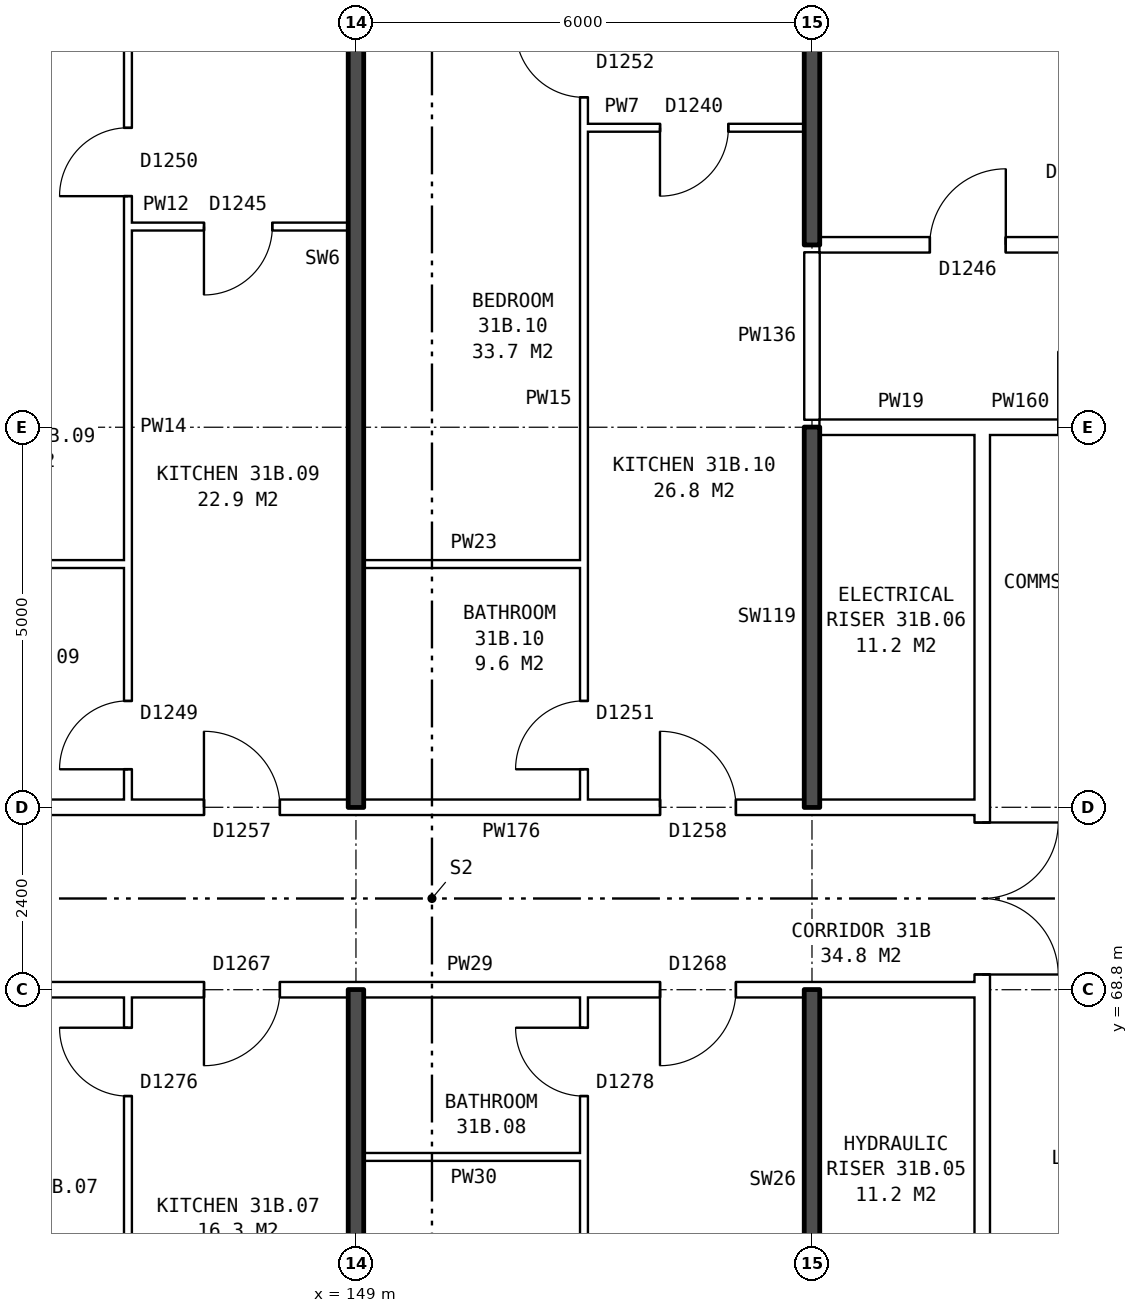
"""IFC4 building model, lengths in metres.
Left out: names, types, materials, properties, quantities, classifications, styles, units other than length and angle.
Written with IfcOpenShell. Run it as: python <this file> out.ifc"""

import sys

from ifc_helpers import new_model, si_unit, direction, frame, frame_2d, origin, place, context, subcontext, project, spatial, rectangle, extrude, element, fill, save


model = new_model("IFC4")
c1 = context("Model", 3, precision=1e-05, world=origin(), true_north=direction((0.0, 1.0)))
c2 = subcontext(c1, "Body", "Model", "MODEL_VIEW")
j1 = project(units=[si_unit("LENGTHUNIT", "METRE"), si_unit("PLANEANGLEUNIT", "RADIAN")], contexts=[c1])
p1 = place(None, origin())
s1 = spatial("IfcSite", under=j1, at=p1, CompositionType="ELEMENT")
p2 = place(p1, origin())
s2 = spatial("IfcBuilding", under=s1, at=p2, CompositionType="ELEMENT")
p3 = place(p2, frame((0.0, 0.0, 111.9)))
s3 = spatial("IfcBuildingStorey", under=s2, at=p3, CompositionType="ELEMENT", Elevation=111.9)
p4 = place(p3, frame((157.24, 63.9, 0.0), z_axis=(0.0, 0.0, 1.0), x_axis=(0.0, 1.0, 0.0)))
e1 = element("IfcWall", 1, at=p4, inside=s3, PredefinedType="PARTITIONING", context=c2, shape_type="SweptSolid", body=[
    extrude(rectangle(XDim=12.2, YDim=0.2, at=frame_2d((6.1, 0.0))), origin(), (0.0, 0.0, 1.0), 2.85),
])
p5 = place(p4, frame((5.1, 0.0, 0.0)))
e2 = element("IfcOpeningElement", 2, at=p5, cuts=e1, PredefinedType="OPENING", context=c2, shape_type="SweptSolid", body=[
    extrude(rectangle(XDim=2.0, YDim=2.1, at=frame_2d((1.0, 1.05))), frame((0.0, 0.11, 0.0), z_axis=(0.0, -1.0, 0.0), x_axis=(1.0, 0.0, 0.0)), (0.0, 0.0, 1.0), 0.22),
])
p6 = place(p3, frame((149.1, 66.6, 0.0), z_axis=(0.0, 0.0, 1.0), x_axis=(1.0, 0.0, 0.0)))
e3 = element("IfcWall", 3, at=p6, inside=s3, PredefinedType="PARTITIONING", context=c2, shape_type="SweptSolid", body=[
    extrude(rectangle(XDim=2.9, YDim=0.1, at=frame_2d((1.45, 0.0))), origin(), (0.0, 0.0, 1.0), 2.85),
])
p7 = place(p3, frame((142.76, 68.8, 0.0), z_axis=(0.0, 0.0, 1.0), x_axis=(1.0, 0.0, 0.0)))
e4 = element("IfcWall", 4, at=p7, inside=s3, PredefinedType="PARTITIONING", context=c2, shape_type="SweptSolid", body=[
    extrude(rectangle(XDim=14.48, YDim=0.2, at=frame_2d((7.24, 0.0))), origin(), (0.0, 0.0, 1.0), 2.85),
])
p8 = place(p7, frame((4.24, 0.0, 0.0)))
e5 = element("IfcOpeningElement", 5, at=p8, cuts=e4, PredefinedType="OPENING", context=c2, shape_type="SweptSolid", body=[
    extrude(rectangle(XDim=1.0, YDim=2.1, at=frame_2d((0.5, 1.05))), frame((0.0, 0.11, 0.0), z_axis=(0.0, -1.0, 0.0), x_axis=(1.0, 0.0, 0.0)), (0.0, 0.0, 1.0), 0.22),
])
p9 = place(p7, frame((10.24, 0.0, 0.0)))
e6 = element("IfcOpeningElement", 6, at=p9, cuts=e4, PredefinedType="OPENING", context=c2, shape_type="SweptSolid", body=[
    extrude(rectangle(XDim=1.0, YDim=2.1, at=frame_2d((0.5, 1.05))), frame((0.0, 0.11, 0.0), z_axis=(0.0, -1.0, 0.0), x_axis=(1.0, 0.0, 0.0)), (0.0, 0.0, 1.0), 0.22),
])
p10 = place(p3, frame((142.76, 71.2, 0.0), z_axis=(0.0, 0.0, 1.0), x_axis=(1.0, 0.0, 0.0)))
e7 = element("IfcWall", 7, at=p10, inside=s3, PredefinedType="PARTITIONING", context=c2, shape_type="SweptSolid", body=[
    extrude(rectangle(XDim=14.48, YDim=0.2, at=frame_2d((7.24, 0.0))), origin(), (0.0, 0.0, 1.0), 2.85),
])
p11 = place(p10, frame((4.24, 0.0, 0.0)))
e8 = element("IfcOpeningElement", 8, at=p11, cuts=e7, PredefinedType="OPENING", context=c2, shape_type="SweptSolid", body=[
    extrude(rectangle(XDim=1.0, YDim=2.1, at=frame_2d((0.5, 1.05))), frame((0.0, 0.11, 0.0), z_axis=(0.0, -1.0, 0.0), x_axis=(1.0, 0.0, 0.0)), (0.0, 0.0, 1.0), 0.22),
])
p12 = place(p10, frame((10.24, 0.0, 0.0)))
e9 = element("IfcOpeningElement", 9, at=p12, cuts=e7, PredefinedType="OPENING", context=c2, shape_type="SweptSolid", body=[
    extrude(rectangle(XDim=1.0, YDim=2.1, at=frame_2d((0.5, 1.05))), frame((0.0, 0.11, 0.0), z_axis=(0.0, -1.0, 0.0), x_axis=(1.0, 0.0, 0.0)), (0.0, 0.0, 1.0), 0.22),
])
p13 = place(p3, frame((142.76, 74.4, 0.0), z_axis=(0.0, 0.0, 1.0), x_axis=(1.0, 0.0, 0.0)))
e10 = element("IfcWall", 10, at=p13, inside=s3, PredefinedType="PARTITIONING", context=c2, shape_type="SweptSolid", body=[
    extrude(rectangle(XDim=3.24, YDim=0.1, at=frame_2d((1.62, 0.0))), origin(), (0.0, 0.0, 1.0), 2.85),
])
p14 = place(p3, frame((149.1, 74.4, 0.0), z_axis=(0.0, 0.0, 1.0), x_axis=(1.0, 0.0, 0.0)))
e11 = element("IfcWall", 11, at=p14, inside=s3, PredefinedType="PARTITIONING", context=c2, shape_type="SweptSolid", body=[
    extrude(rectangle(XDim=2.9, YDim=0.1, at=frame_2d((1.45, 0.0))), origin(), (0.0, 0.0, 1.0), 2.85),
])
p15 = place(p3, frame((155.1, 76.2, 0.0), z_axis=(0.0, 0.0, 1.0), x_axis=(1.0, 0.0, 0.0)))
e12 = element("IfcWall", 12, at=p15, inside=s3, PredefinedType="PARTITIONING", context=c2, shape_type="SweptSolid", body=[
    extrude(rectangle(XDim=2.14, YDim=0.2, at=frame_2d((1.07, 0.0))), origin(), (0.0, 0.0, 1.0), 2.85),
])
p16 = place(p3, frame((157.24, 76.2, 0.0), z_axis=(0.0, 0.0, 1.0), x_axis=(1.0, 0.0, 0.0)))
e13 = element("IfcWall", 13, at=p16, inside=s3, PredefinedType="PARTITIONING", context=c2, shape_type="SweptSolid", body=[
    extrude(rectangle(XDim=3.0, YDim=0.2, at=frame_2d((1.5, 0.0))), origin(), (0.0, 0.0, 1.0), 2.85),
])
p17 = place(p16, frame((1.0, 0.0, 0.0)))
e14 = element("IfcOpeningElement", 14, at=p17, cuts=e13, PredefinedType="OPENING", context=c2, shape_type="SweptSolid", body=[
    extrude(rectangle(XDim=1.0, YDim=2.1, at=frame_2d((0.5, 1.05))), frame((0.0, 0.11, 0.0), z_axis=(0.0, -1.0, 0.0), x_axis=(1.0, 0.0, 0.0)), (0.0, 0.0, 1.0), 0.22),
])
p18 = place(p3, frame((155.1, 78.6, 0.0), z_axis=(0.0, 0.0, 1.0), x_axis=(1.0, 0.0, 0.0)))
e15 = element("IfcWall", 15, at=p18, inside=s3, PredefinedType="PARTITIONING", context=c2, shape_type="SweptSolid", body=[
    extrude(rectangle(XDim=18.54, YDim=0.2, at=frame_2d((9.27, 0.0))), origin(), (0.0, 0.0, 1.0), 2.85),
])
p19 = place(p18, frame((1.45, 0.0, 0.0)))
e16 = element("IfcOpeningElement", 16, at=p19, cuts=e15, PredefinedType="OPENING", context=c2, shape_type="SweptSolid", body=[
    extrude(rectangle(XDim=1.0, YDim=2.1, at=frame_2d((0.5, 1.05))), frame((0.0, 0.11, 0.0), z_axis=(0.0, -1.0, 0.0), x_axis=(1.0, 0.0, 0.0)), (0.0, 0.0, 1.0), 0.22),
])
p20 = place(p18, frame((9.6, 0.0, 0.0)))
e17 = element("IfcOpeningElement", 17, at=p20, cuts=e15, PredefinedType="OPENING", context=c2, shape_type="SweptSolid", body=[
    extrude(rectangle(XDim=1.0, YDim=2.1, at=frame_2d((0.5, 1.05))), frame((0.0, 0.11, 0.0), z_axis=(0.0, -1.0, 0.0), x_axis=(1.0, 0.0, 0.0)), (0.0, 0.0, 1.0), 0.22),
])
p21 = place(p18, frame((15.92, 0.0, 0.0)))
e18 = element("IfcOpeningElement", 18, at=p21, cuts=e15, PredefinedType="OPENING", context=c2, shape_type="SweptSolid", body=[
    extrude(rectangle(XDim=1.0, YDim=2.1, at=frame_2d((0.5, 1.05))), frame((0.0, 0.11, 0.0), z_axis=(0.0, -1.0, 0.0), x_axis=(1.0, 0.0, 0.0)), (0.0, 0.0, 1.0), 0.22),
])
p22 = place(p3, frame((146.0, 78.84, 0.0), z_axis=(0.0, 0.0, 1.0), x_axis=(1.0, 0.0, 0.0)))
e19 = element("IfcWall", 19, at=p22, inside=s3, PredefinedType="PARTITIONING", context=c2, shape_type="SweptSolid", body=[
    extrude(rectangle(XDim=2.9, YDim=0.1, at=frame_2d((1.45, 0.0))), origin(), (0.0, 0.0, 1.0), 2.85),
])
p23 = place(p22, frame((1.0, 0.0, 0.0)))
e20 = element("IfcOpeningElement", 20, at=p23, cuts=e19, PredefinedType="OPENING", context=c2, shape_type="SweptSolid", body=[
    extrude(rectangle(XDim=0.9, YDim=2.1, at=frame_2d((0.45, 1.05))), frame((0.0, 0.06, 0.0), z_axis=(0.0, -1.0, 0.0), x_axis=(1.0, 0.0, 0.0)), (0.0, 0.0, 1.0), 0.12),
])
p24 = place(p3, frame((152.0, 80.14, 0.0), z_axis=(0.0, 0.0, 1.0), x_axis=(1.0, 0.0, 0.0)))
e21 = element("IfcWall", 21, at=p24, inside=s3, PredefinedType="PARTITIONING", context=c2, shape_type="SweptSolid", body=[
    extrude(rectangle(XDim=2.9, YDim=0.1, at=frame_2d((1.45, 0.0))), origin(), (0.0, 0.0, 1.0), 2.85),
])
p25 = place(p24, frame((1.0, 0.0, 0.0)))
e22 = element("IfcOpeningElement", 22, at=p25, cuts=e21, PredefinedType="OPENING", context=c2, shape_type="SweptSolid", body=[
    extrude(rectangle(XDim=0.9, YDim=2.1, at=frame_2d((0.45, 1.05))), frame((0.0, 0.06, 0.0), z_axis=(0.0, -1.0, 0.0), x_axis=(1.0, 0.0, 0.0)), (0.0, 0.0, 1.0), 0.12),
])
p26 = place(p3, frame((146.0, 54.36, 0.0), z_axis=(0.0, 0.0, 1.0), x_axis=(0.0, 1.0, 0.0)))
e23 = element("IfcWall", 23, at=p26, inside=s3, PredefinedType="PARTITIONING", context=c2, shape_type="SweptSolid", body=[
    extrude(rectangle(XDim=14.34, YDim=0.1, at=frame_2d((7.17, 0.0))), origin(), (0.0, 0.0, 1.0), 2.85),
])
p27 = place(p26, frame((7.7, 0.0, 0.0)))
e24 = element("IfcOpeningElement", 24, at=p27, cuts=e23, PredefinedType="OPENING", context=c2, shape_type="SweptSolid", body=[
    extrude(rectangle(XDim=0.9, YDim=2.1, at=frame_2d((0.45, 1.05))), frame((0.0, 0.06, 0.0), z_axis=(0.0, -1.0, 0.0), x_axis=(1.0, 0.0, 0.0)), (0.0, 0.0, 1.0), 0.12),
])
p28 = place(p26, frame((13.04, 0.0, 0.0)))
e25 = element("IfcOpeningElement", 25, at=p28, cuts=e23, PredefinedType="OPENING", context=c2, shape_type="SweptSolid", body=[
    extrude(rectangle(XDim=0.9, YDim=2.1, at=frame_2d((0.45, 1.05))), frame((0.0, 0.06, 0.0), z_axis=(0.0, -1.0, 0.0), x_axis=(1.0, 0.0, 0.0)), (0.0, 0.0, 1.0), 0.12),
])
p29 = place(p3, frame((146.0, 71.3, 0.0), z_axis=(0.0, 0.0, 1.0), x_axis=(0.0, 1.0, 0.0)))
e26 = element("IfcWall", 26, at=p29, inside=s3, PredefinedType="PARTITIONING", context=c2, shape_type="SweptSolid", body=[
    extrude(rectangle(XDim=14.34, YDim=0.1, at=frame_2d((7.17, 0.0))), origin(), (0.0, 0.0, 1.0), 2.85),
])
p30 = place(p29, frame((7.94, 0.0, 0.0)))
e27 = element("IfcOpeningElement", 27, at=p30, cuts=e26, PredefinedType="OPENING", context=c2, shape_type="SweptSolid", body=[
    extrude(rectangle(XDim=0.9, YDim=2.1, at=frame_2d((0.45, 1.05))), frame((0.0, 0.06, 0.0), z_axis=(0.0, -1.0, 0.0), x_axis=(1.0, 0.0, 0.0)), (0.0, 0.0, 1.0), 0.12),
])
p31 = place(p29, frame((0.4, 0.0, 0.0)))
e28 = element("IfcOpeningElement", 28, at=p31, cuts=e26, PredefinedType="OPENING", context=c2, shape_type="SweptSolid", body=[
    extrude(rectangle(XDim=0.9, YDim=2.1, at=frame_2d((0.45, 1.05))), frame((0.0, 0.06, 0.0), z_axis=(0.0, -1.0, 0.0), x_axis=(1.0, 0.0, 0.0)), (0.0, 0.0, 1.0), 0.12),
])
for number, where, z_axis, x_axis in (
    (29, (149.0, 54.36, 0.0), (0.0, 0.0, 1.0), (0.0, 1.0, 0.0)),
    (30, (149.0, 71.2, 0.0), (0.0, 0.0, 1.0), (0.0, 1.0, 0.0)),
):
    element("IfcWall", number, at=place(p3, frame(where, z_axis=z_axis, x_axis=x_axis)), inside=s3, PredefinedType="SOLIDWALL", context=c2, shape_type="SweptSolid", body=[
        extrude(rectangle(XDim=14.44, YDim=0.2, at=frame_2d((7.22, 0.0))), origin(), (0.0, 0.0, 1.0), 2.85),
    ])
p32 = place(p3, frame((152.0, 54.36, 0.0), z_axis=(0.0, 0.0, 1.0), x_axis=(0.0, 1.0, 0.0)))
e31 = element("IfcWall", 31, at=p32, inside=s3, PredefinedType="PARTITIONING", context=c2, shape_type="SweptSolid", body=[
    extrude(rectangle(XDim=14.34, YDim=0.1, at=frame_2d((7.17, 0.0))), origin(), (0.0, 0.0, 1.0), 2.85),
])
p33 = place(p32, frame((7.7, 0.0, 0.0)))
e32 = element("IfcOpeningElement", 32, at=p33, cuts=e31, PredefinedType="OPENING", context=c2, shape_type="SweptSolid", body=[
    extrude(rectangle(XDim=0.9, YDim=2.1, at=frame_2d((0.45, 1.05))), frame((0.0, 0.06, 0.0), z_axis=(0.0, -1.0, 0.0), x_axis=(1.0, 0.0, 0.0)), (0.0, 0.0, 1.0), 0.12),
])
p34 = place(p32, frame((13.04, 0.0, 0.0)))
e33 = element("IfcOpeningElement", 33, at=p34, cuts=e31, PredefinedType="OPENING", context=c2, shape_type="SweptSolid", body=[
    extrude(rectangle(XDim=0.9, YDim=2.1, at=frame_2d((0.45, 1.05))), frame((0.0, 0.06, 0.0), z_axis=(0.0, -1.0, 0.0), x_axis=(1.0, 0.0, 0.0)), (0.0, 0.0, 1.0), 0.12),
])
p35 = place(p3, frame((152.0, 71.3, 0.0), z_axis=(0.0, 0.0, 1.0), x_axis=(0.0, 1.0, 0.0)))
e34 = element("IfcWall", 34, at=p35, inside=s3, PredefinedType="PARTITIONING", context=c2, shape_type="SweptSolid", body=[
    extrude(rectangle(XDim=14.34, YDim=0.1, at=frame_2d((7.17, 0.0))), origin(), (0.0, 0.0, 1.0), 2.85),
])
p36 = place(p35, frame((9.24, 0.0, 0.0)))
e35 = element("IfcOpeningElement", 35, at=p36, cuts=e34, PredefinedType="OPENING", context=c2, shape_type="SweptSolid", body=[
    extrude(rectangle(XDim=0.9, YDim=2.1, at=frame_2d((0.45, 1.05))), frame((0.0, 0.06, 0.0), z_axis=(0.0, -1.0, 0.0), x_axis=(1.0, 0.0, 0.0)), (0.0, 0.0, 1.0), 0.12),
])
p37 = place(p35, frame((0.4, 0.0, 0.0)))
e36 = element("IfcOpeningElement", 36, at=p37, cuts=e34, PredefinedType="OPENING", context=c2, shape_type="SweptSolid", body=[
    extrude(rectangle(XDim=0.9, YDim=2.1, at=frame_2d((0.45, 1.05))), frame((0.0, 0.06, 0.0), z_axis=(0.0, -1.0, 0.0), x_axis=(1.0, 0.0, 0.0)), (0.0, 0.0, 1.0), 0.12),
])
for number, where, z_axis, x_axis in (
    (37, (155.0, 63.8, 0.0), (0.0, 0.0, 1.0), (0.0, 1.0, 0.0)),
    (38, (155.0, 71.2, 0.0), (0.0, 0.0, 1.0), (0.0, 1.0, 0.0)),
):
    element("IfcWall", number, at=place(p3, frame(where, z_axis=z_axis, x_axis=x_axis)), inside=s3, PredefinedType="SOLIDWALL", context=c2, shape_type="SweptSolid", body=[
        extrude(rectangle(XDim=5.0, YDim=0.2, at=frame_2d((2.5, 0.0))), origin(), (0.0, 0.0, 1.0), 2.85),
    ])
p38 = place(p3, frame((155.0, 76.3, 0.0), z_axis=(0.0, 0.0, 1.0), x_axis=(0.0, 1.0, 0.0)))
e39 = element("IfcWall", 39, at=p38, inside=s3, PredefinedType="PARTITIONING", context=c2, shape_type="SweptSolid", body=[
    extrude(rectangle(XDim=2.2, YDim=0.2, at=frame_2d((1.1, 0.0))), origin(), (0.0, 0.0, 1.0), 2.85),
])
p39 = place(p3, frame((155.0, 78.6, 0.0), z_axis=(0.0, 0.0, 1.0), x_axis=(0.0, 1.0, 0.0)))
e40 = element("IfcWall", 40, at=p39, inside=s3, PredefinedType="SOLIDWALL", context=c2, shape_type="SweptSolid", body=[
    extrude(rectangle(XDim=7.04, YDim=0.2, at=frame_2d((3.52, 0.0))), origin(), (0.0, 0.0, 1.0), 2.85),
])
p40 = place(p5, frame((2.0, 0.0, 0.0), z_axis=(0.0, 0.0, 1.0), x_axis=(-1.0, 0.0, 0.0)))
e41 = element("IfcDoor", 41, at=p40, inside=s3, OperationType="DOUBLE_DOOR_SINGLE_SWING", PredefinedType="DOOR", context=c2, shape_type="SweptSolid", body=[
    extrude(rectangle(XDim=2.0, YDim=2.1, at=frame_2d((1.0, 1.05))), frame((0.0, 0.025, 0.0), z_axis=(0.0, -1.0, 0.0), x_axis=(1.0, 0.0, 0.0)), (0.0, 0.0, 1.0), 0.05),
])
fill(e2, e41)
p41 = place(p8, frame((1.0, 0.0, 0.0), z_axis=(0.0, 0.0, 1.0), x_axis=(-1.0, 0.0, 0.0)))
e42 = element("IfcDoor", 42, at=p41, inside=s3, OperationType="SINGLE_SWING_RIGHT", PredefinedType="DOOR", context=c2, shape_type="SweptSolid", body=[
    extrude(rectangle(XDim=1.0, YDim=2.1, at=frame_2d((0.5, 1.05))), frame((0.0, 0.025, 0.0), z_axis=(0.0, -1.0, 0.0), x_axis=(1.0, 0.0, 0.0)), (0.0, 0.0, 1.0), 0.05),
])
fill(e5, e42)
p42 = place(p28, origin())
e43 = element("IfcDoor", 43, at=p42, inside=s3, OperationType="SINGLE_SWING_RIGHT", PredefinedType="DOOR", context=c2, shape_type="SweptSolid", body=[
    extrude(rectangle(XDim=0.9, YDim=2.1, at=frame_2d((0.45, 1.05))), frame((0.0, 0.025, 0.0), z_axis=(0.0, -1.0, 0.0), x_axis=(1.0, 0.0, 0.0)), (0.0, 0.0, 1.0), 0.05),
])
fill(e25, e43)
p43 = place(p9, frame((1.0, 0.0, 0.0), z_axis=(0.0, 0.0, 1.0), x_axis=(-1.0, 0.0, 0.0)))
e44 = element("IfcDoor", 44, at=p43, inside=s3, OperationType="SINGLE_SWING_RIGHT", PredefinedType="DOOR", context=c2, shape_type="SweptSolid", body=[
    extrude(rectangle(XDim=1.0, YDim=2.1, at=frame_2d((0.5, 1.05))), frame((0.0, 0.025, 0.0), z_axis=(0.0, -1.0, 0.0), x_axis=(1.0, 0.0, 0.0)), (0.0, 0.0, 1.0), 0.05),
])
fill(e6, e44)
p44 = place(p34, origin())
e45 = element("IfcDoor", 45, at=p44, inside=s3, OperationType="SINGLE_SWING_RIGHT", PredefinedType="DOOR", context=c2, shape_type="SweptSolid", body=[
    extrude(rectangle(XDim=0.9, YDim=2.1, at=frame_2d((0.45, 1.05))), frame((0.0, 0.025, 0.0), z_axis=(0.0, -1.0, 0.0), x_axis=(1.0, 0.0, 0.0)), (0.0, 0.0, 1.0), 0.05),
])
fill(e33, e45)
p45 = place(p30, origin())
e46 = element("IfcDoor", 46, at=p45, inside=s3, OperationType="SINGLE_SWING_LEFT", PredefinedType="DOOR", context=c2, shape_type="SweptSolid", body=[
    extrude(rectangle(XDim=0.9, YDim=2.1, at=frame_2d((0.45, 1.05))), frame((0.0, 0.025, 0.0), z_axis=(0.0, -1.0, 0.0), x_axis=(1.0, 0.0, 0.0)), (0.0, 0.0, 1.0), 0.05),
])
fill(e27, e46)
p46 = place(p11, origin())
e47 = element("IfcDoor", 47, at=p46, inside=s3, OperationType="SINGLE_SWING_LEFT", PredefinedType="DOOR", context=c2, shape_type="SweptSolid", body=[
    extrude(rectangle(XDim=1.0, YDim=2.1, at=frame_2d((0.5, 1.05))), frame((0.0, 0.025, 0.0), z_axis=(0.0, -1.0, 0.0), x_axis=(1.0, 0.0, 0.0)), (0.0, 0.0, 1.0), 0.05),
])
fill(e8, e47)
p47 = place(p23, frame((0.9, 0.0, 0.0), z_axis=(0.0, 0.0, 1.0), x_axis=(-1.0, 0.0, 0.0)))
e48 = element("IfcDoor", 48, at=p47, inside=s3, OperationType="SINGLE_SWING_RIGHT", PredefinedType="DOOR", context=c2, shape_type="SweptSolid", body=[
    extrude(rectangle(XDim=0.9, YDim=2.1, at=frame_2d((0.45, 1.05))), frame((0.0, 0.025, 0.0), z_axis=(0.0, -1.0, 0.0), x_axis=(1.0, 0.0, 0.0)), (0.0, 0.0, 1.0), 0.05),
])
fill(e20, e48)
p48 = place(p31, origin())
e49 = element("IfcDoor", 49, at=p48, inside=s3, OperationType="SINGLE_SWING_LEFT", PredefinedType="DOOR", context=c2, shape_type="SweptSolid", body=[
    extrude(rectangle(XDim=0.9, YDim=2.1, at=frame_2d((0.45, 1.05))), frame((0.0, 0.025, 0.0), z_axis=(0.0, -1.0, 0.0), x_axis=(1.0, 0.0, 0.0)), (0.0, 0.0, 1.0), 0.05),
])
fill(e28, e49)
p49 = place(p36, origin())
e50 = element("IfcDoor", 50, at=p49, inside=s3, OperationType="SINGLE_SWING_RIGHT", PredefinedType="DOOR", context=c2, shape_type="SweptSolid", body=[
    extrude(rectangle(XDim=0.9, YDim=2.1, at=frame_2d((0.45, 1.05))), frame((0.0, 0.025, 0.0), z_axis=(0.0, -1.0, 0.0), x_axis=(1.0, 0.0, 0.0)), (0.0, 0.0, 1.0), 0.05),
])
fill(e35, e50)
p50 = place(p12, origin())
e51 = element("IfcDoor", 51, at=p50, inside=s3, OperationType="SINGLE_SWING_LEFT", PredefinedType="DOOR", context=c2, shape_type="SweptSolid", body=[
    extrude(rectangle(XDim=1.0, YDim=2.1, at=frame_2d((0.5, 1.05))), frame((0.0, 0.025, 0.0), z_axis=(0.0, -1.0, 0.0), x_axis=(1.0, 0.0, 0.0)), (0.0, 0.0, 1.0), 0.05),
])
fill(e9, e51)
p51 = place(p25, frame((0.9, 0.0, 0.0), z_axis=(0.0, 0.0, 1.0), x_axis=(-1.0, 0.0, 0.0)))
e52 = element("IfcDoor", 52, at=p51, inside=s3, OperationType="SINGLE_SWING_RIGHT", PredefinedType="DOOR", context=c2, shape_type="SweptSolid", body=[
    extrude(rectangle(XDim=0.9, YDim=2.1, at=frame_2d((0.45, 1.05))), frame((0.0, 0.025, 0.0), z_axis=(0.0, -1.0, 0.0), x_axis=(1.0, 0.0, 0.0)), (0.0, 0.0, 1.0), 0.05),
])
fill(e22, e52)
p52 = place(p37, origin())
e53 = element("IfcDoor", 53, at=p52, inside=s3, OperationType="SINGLE_SWING_LEFT", PredefinedType="DOOR", context=c2, shape_type="SweptSolid", body=[
    extrude(rectangle(XDim=0.9, YDim=2.1, at=frame_2d((0.45, 1.05))), frame((0.0, 0.025, 0.0), z_axis=(0.0, -1.0, 0.0), x_axis=(1.0, 0.0, 0.0)), (0.0, 0.0, 1.0), 0.05),
])
fill(e36, e53)
p53 = place(p19, origin())
e54 = element("IfcDoor", 54, at=p53, inside=s3, OperationType="SINGLE_SWING_RIGHT", PredefinedType="DOOR", context=c2, shape_type="SweptSolid", body=[
    extrude(rectangle(XDim=1.0, YDim=2.1, at=frame_2d((0.5, 1.05))), frame((0.0, 0.025, 0.0), z_axis=(0.0, -1.0, 0.0), x_axis=(1.0, 0.0, 0.0)), (0.0, 0.0, 1.0), 0.05),
])
fill(e16, e54)
save(model, sys.argv[1])
